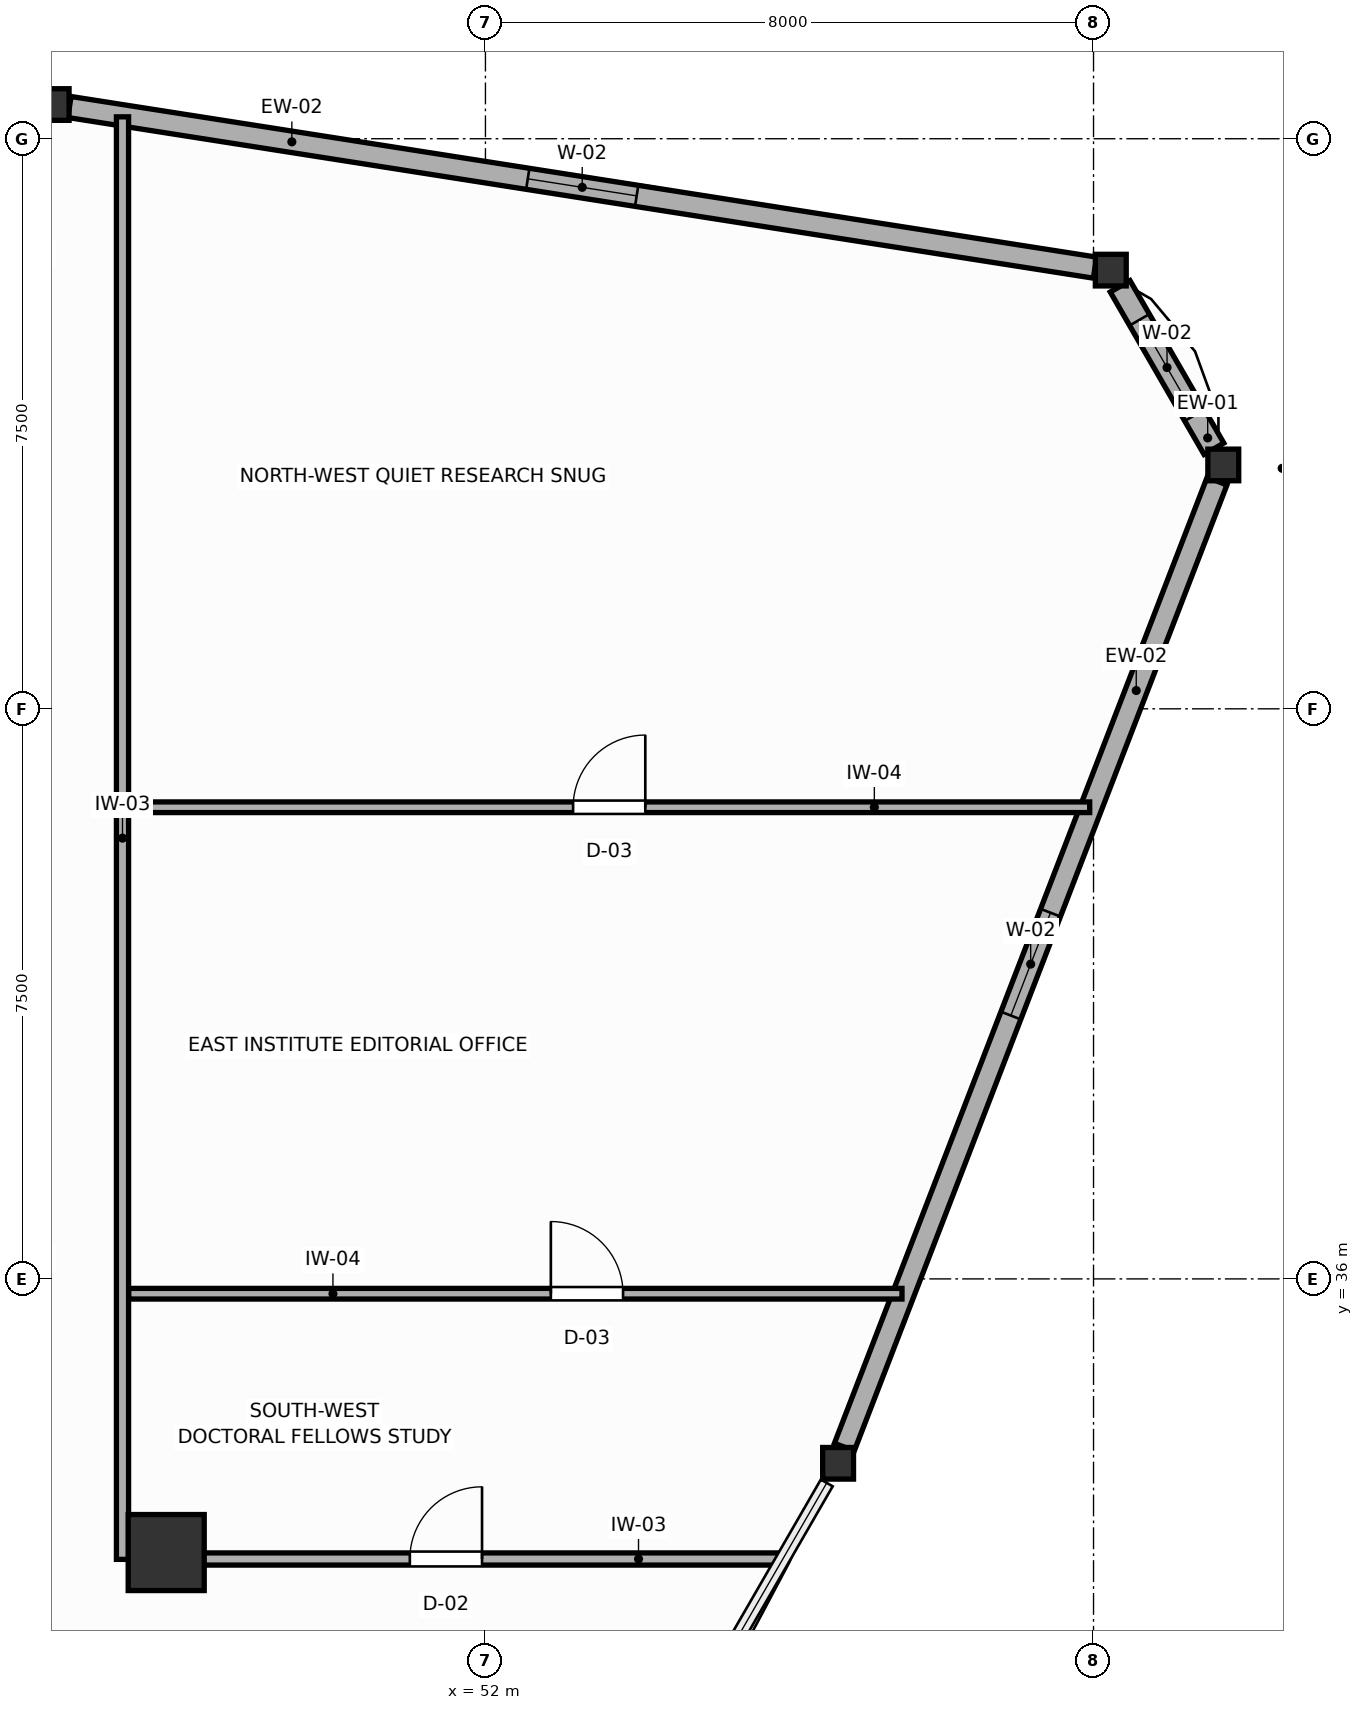
"""IFC4 building model, lengths in metres.
Left out: names, types, materials, properties, quantities, classifications, styles, units other than length and angle.
Written with IfcOpenShell. Run it as: python <this file> out.ifc"""

import sys

from ifc_helpers import new_model, si_unit, direction, frame, frame_2d, origin, origin_2d, place, context, subcontext, project, spatial, rectangle, i_section, extrude, source, transform, mapped, element, fill, save


model = new_model("IFC4")
c1 = context("Model", 3, precision=1e-05, world=origin(), true_north=direction((0.0, 1.0)))
c2 = subcontext(c1, "Body", "Model", "MODEL_VIEW")
j1 = project(units=[si_unit("LENGTHUNIT", "METRE"), si_unit("PLANEANGLEUNIT", "RADIAN")], contexts=[c1])
p1 = place(None, origin())
s1 = spatial("IfcSite", under=j1, at=p1, CompositionType="ELEMENT")
p2 = place(p1, origin())
s2 = spatial("IfcBuilding", under=s1, at=p2, CompositionType="ELEMENT")
p3 = place(p2, frame((0.0, 0.0, 216.6)))
s3 = spatial("IfcBuildingStorey", under=s2, at=p3, CompositionType="ELEMENT", Elevation=216.6)
m1 = source(origin(), c2, "Body", "SweptSolid", [
    extrude(rectangle(XDim=1.0, YDim=1.0, at=origin_2d()), origin(), (0.0, 0.0, 1.0), 3.6),
])
p4 = place(p3, frame((47.8, 32.4, 0.0), z_axis=(0.0, 0.0, 1.0), x_axis=(1.0, 0.0, 0.0)))
e1 = element("IfcColumn", 1, at=p4, inside=s3, PredefinedType="COLUMN", context=c2, shape_type="MappedRepresentation", body=[
    mapped(m1, transform((0.0, 0.0, 0.0), scale=1.0)),
])
m2 = source(origin(), c2, "Body", "SweptSolid", [
    extrude(i_section(OverallWidth=0.406, OverallDepth=0.416, WebThickness=0.027, FlangeThickness=0.044, FilletRadius=0.015, at=origin_2d()), origin(), (0.0, 0.0, 1.0), 3.6),
])
for number, where, z_axis, x_axis in (
    (2, (61.707, 46.708, 0.0), (0.0, 0.0, 1.0), (1.0, 0.0, 0.0)),
    (3, (60.227, 49.271, 0.0), (0.0, 0.0, 1.0), (1.0, 0.0, 0.0)),
    (4, (46.319, 51.45, 0.0), (0.0, 0.0, 1.0), (1.0, 0.0, 0.0)),
    (5, (56.639, 33.574, 0.0), (0.0, 0.0, 1.0), (1.0, 0.0, 0.0)),
):
    element("IfcColumn", number, at=place(p3, frame(where, z_axis=z_axis, x_axis=x_axis)), inside=s3, PredefinedType="COLUMN", context=c2, shape_type="MappedRepresentation", body=[
        mapped(m2, transform((0.0, 0.0, 0.0), scale=1.0)),
    ])
p5 = place(p3, frame((61.584, 46.921, 0.0), z_axis=(0.0, 0.0, 1.0), x_axis=(-0.499990780478, 0.866030726613, 0.0)))
e6 = element("IfcWall", 6, at=p5, inside=s3, PredefinedType="SOLIDWALL", context=c2, shape_type="SweptSolid", body=[
    extrude(rectangle(XDim=2.468, YDim=0.3, at=frame_2d((1.234, 0.0))), origin(), (0.0, 0.0, 1.0), 3.02),
])
p6 = place(p5, frame((0.509, 0.0, 0.75)))
e7 = element("IfcOpeningElement", 7, at=p6, cuts=e6, PredefinedType="OPENING", context=c2, shape_type="SweptSolid", body=[
    extrude(rectangle(XDim=1.45, YDim=1.65, at=frame_2d((0.725, 0.825))), frame((0.0, 0.16, 0.0), z_axis=(0.0, -1.0, 0.0), x_axis=(1.0, 0.0, 0.0)), (0.0, 0.0, 1.0), 0.32),
])
p7 = place(p3, frame((60.019, 49.304, 0.0), z_axis=(0.0, 0.0, 1.0), x_axis=(-0.987957437721, 0.154725890697, 0.0)))
e8 = element("IfcWall", 8, at=p7, inside=s3, PredefinedType="SOLIDWALL", context=c2, shape_type="SweptSolid", body=[
    extrude(rectangle(XDim=13.657, YDim=0.28, at=frame_2d((6.828, 0.0))), origin(), (0.0, 0.0, 1.0), 3.02),
])
p8 = place(p7, frame((6.103, 0.0, 0.75)))
e9 = element("IfcOpeningElement", 9, at=p8, cuts=e8, PredefinedType="OPENING", context=c2, shape_type="SweptSolid", body=[
    extrude(rectangle(XDim=1.45, YDim=1.65, at=frame_2d((0.725, 0.825))), frame((0.0, 0.15, 0.0), z_axis=(0.0, -1.0, 0.0), x_axis=(1.0, 0.0, 0.0)), (0.0, 0.0, 1.0), 0.3),
])
p9 = place(p3, frame((56.722, 33.787, 0.0), z_axis=(0.0, 0.0, 1.0), x_axis=(0.359972142588, 0.932963052088, 0.0)))
e10 = element("IfcWall", 10, at=p9, inside=s3, PredefinedType="SOLIDWALL", context=c2, shape_type="SweptSolid", body=[
    extrude(rectangle(XDim=13.621, YDim=0.28, at=frame_2d((6.811, 0.0))), origin(), (0.0, 0.0, 1.0), 3.02),
])
p10 = place(p9, frame((6.086, 0.0, 0.75)))
e11 = element("IfcOpeningElement", 11, at=p10, cuts=e10, PredefinedType="OPENING", context=c2, shape_type="SweptSolid", body=[
    extrude(rectangle(XDim=1.45, YDim=1.65, at=frame_2d((0.725, 0.825))), frame((0.0, 0.15, 0.0), z_axis=(0.0, -1.0, 0.0), x_axis=(1.0, 0.0, 0.0)), (0.0, 0.0, 1.0), 0.3),
])
p11 = place(p3, frame((47.225, 32.31, 0.0), z_axis=(0.0, 0.0, 1.0), x_axis=(0.0, 1.0, 0.0)))
e12 = element("IfcWall", 12, at=p11, inside=s3, PredefinedType="PARTITIONING", context=c2, shape_type="SweptSolid", body=[
    extrude(rectangle(XDim=18.978, YDim=0.16, at=frame_2d((9.489, 0.0))), origin(), (0.0, 0.0, 1.0), 3.41),
])
p12 = place(p3, frame((47.307, 32.315, 0.0), z_axis=(0.0, 0.0, 1.0), x_axis=(1.0, 0.0, 0.0)))
e13 = element("IfcWall", 13, at=p12, inside=s3, PredefinedType="PARTITIONING", context=c2, shape_type="SweptSolid", body=[
    extrude(rectangle(XDim=8.586, YDim=0.16, at=frame_2d((4.293, 0.0))), origin(), (0.0, 0.0, 1.0), 2.96),
])
p13 = place(p12, frame((3.698, 0.0, 0.0)))
e14 = element("IfcOpeningElement", 14, at=p13, cuts=e13, PredefinedType="OPENING", context=c2, shape_type="SweptSolid", body=[
    extrude(rectangle(XDim=0.95, YDim=2.05, at=frame_2d((0.475, 1.025))), frame((0.0, 0.09, 0.0), z_axis=(0.0, -1.0, 0.0), x_axis=(1.0, 0.0, 0.0)), (0.0, 0.0, 1.0), 0.18),
])
p14 = place(p3, frame((47.307, 42.205, 0.0), z_axis=(0.0, 0.0, 1.0), x_axis=(1.0, 0.0, 0.0)))
e15 = element("IfcWall", 15, at=p14, inside=s3, PredefinedType="PARTITIONING", context=c2, shape_type="SweptSolid", body=[
    extrude(rectangle(XDim=12.643, YDim=0.14, at=frame_2d((6.321, 0.0))), origin(), (0.0, 0.0, 1.0), 3.41),
])
p15 = place(p14, frame((5.846, 0.0, 0.0)))
e16 = element("IfcOpeningElement", 16, at=p15, cuts=e15, PredefinedType="OPENING", context=c2, shape_type="SweptSolid", body=[
    extrude(rectangle(XDim=0.95, YDim=2.05, at=frame_2d((0.475, 1.025))), frame((0.0, 0.08, 0.0), z_axis=(0.0, -1.0, 0.0), x_axis=(1.0, 0.0, 0.0)), (0.0, 0.0, 1.0), 0.16),
])
p16 = place(p3, frame((47.307, 35.805, 0.0), z_axis=(0.0, 0.0, 1.0), x_axis=(1.0, 0.0, 0.0)))
e17 = element("IfcWall", 17, at=p16, inside=s3, PredefinedType="PARTITIONING", context=c2, shape_type="SweptSolid", body=[
    extrude(rectangle(XDim=10.173, YDim=0.14, at=frame_2d((5.087, 0.0))), origin(), (0.0, 0.0, 1.0), 3.41),
])
p17 = place(p16, frame((5.553, 0.0, 0.0)))
e18 = element("IfcOpeningElement", 18, at=p17, cuts=e17, PredefinedType="OPENING", context=c2, shape_type="SweptSolid", body=[
    extrude(rectangle(XDim=0.95, YDim=2.05, at=frame_2d((0.475, 1.025))), frame((0.0, 0.08, 0.0), z_axis=(0.0, -1.0, 0.0), x_axis=(1.0, 0.0, 0.0)), (0.0, 0.0, 1.0), 0.16),
])
p18 = place(p6, origin())
e19 = element("IfcWindow", 19, at=p18, inside=s3, PartitioningType="SINGLE_PANEL", PredefinedType="WINDOW", context=c2, shape_type="SweptSolid", body=[
    extrude(rectangle(XDim=1.45, YDim=1.65, at=frame_2d((0.725, 0.825))), frame((0.0, 0.03, 0.0), z_axis=(0.0, -1.0, 0.0), x_axis=(1.0, 0.0, 0.0)), (0.0, 0.0, 1.0), 0.06),
])
fill(e7, e19)
p19 = place(p8, origin())
e20 = element("IfcWindow", 20, at=p19, inside=s3, PartitioningType="SINGLE_PANEL", PredefinedType="WINDOW", context=c2, shape_type="SweptSolid", body=[
    extrude(rectangle(XDim=1.45, YDim=1.65, at=frame_2d((0.725, 0.825))), frame((0.0, 0.03, 0.0), z_axis=(0.0, -1.0, 0.0), x_axis=(1.0, 0.0, 0.0)), (0.0, 0.0, 1.0), 0.06),
])
fill(e9, e20)
p20 = place(p10, origin())
e21 = element("IfcWindow", 21, at=p20, inside=s3, PartitioningType="SINGLE_PANEL", PredefinedType="WINDOW", context=c2, shape_type="SweptSolid", body=[
    extrude(rectangle(XDim=1.45, YDim=1.65, at=frame_2d((0.725, 0.825))), frame((0.0, 0.03, 0.0), z_axis=(0.0, -1.0, 0.0), x_axis=(1.0, 0.0, 0.0)), (0.0, 0.0, 1.0), 0.06),
])
fill(e11, e21)
p21 = place(p13, origin())
e22 = element("IfcDoor", 22, at=p21, inside=s3, OperationType="SINGLE_SWING_RIGHT", PredefinedType="DOOR", context=c2, shape_type="SweptSolid", body=[
    extrude(rectangle(XDim=0.95, YDim=2.05, at=frame_2d((0.475, 1.025))), frame((0.0, 0.025, 0.0), z_axis=(0.0, -1.0, 0.0), x_axis=(1.0, 0.0, 0.0)), (0.0, 0.0, 1.0), 0.05),
])
fill(e14, e22)
p22 = place(p15, origin())
e23 = element("IfcDoor", 23, at=p22, inside=s3, OperationType="SINGLE_SWING_RIGHT", PredefinedType="DOOR", context=c2, shape_type="SweptSolid", body=[
    extrude(rectangle(XDim=0.95, YDim=2.05, at=frame_2d((0.475, 1.025))), frame((0.0, 0.025, 0.0), z_axis=(0.0, -1.0, 0.0), x_axis=(1.0, 0.0, 0.0)), (0.0, 0.0, 1.0), 0.05),
])
fill(e16, e23)
p23 = place(p17, origin())
e24 = element("IfcDoor", 24, at=p23, inside=s3, OperationType="SINGLE_SWING_LEFT", PredefinedType="DOOR", context=c2, shape_type="SweptSolid", body=[
    extrude(rectangle(XDim=0.95, YDim=2.05, at=frame_2d((0.475, 1.025))), frame((0.0, 0.025, 0.0), z_axis=(0.0, -1.0, 0.0), x_axis=(1.0, 0.0, 0.0)), (0.0, 0.0, 1.0), 0.05),
])
fill(e18, e24)
save(model, sys.argv[1])
